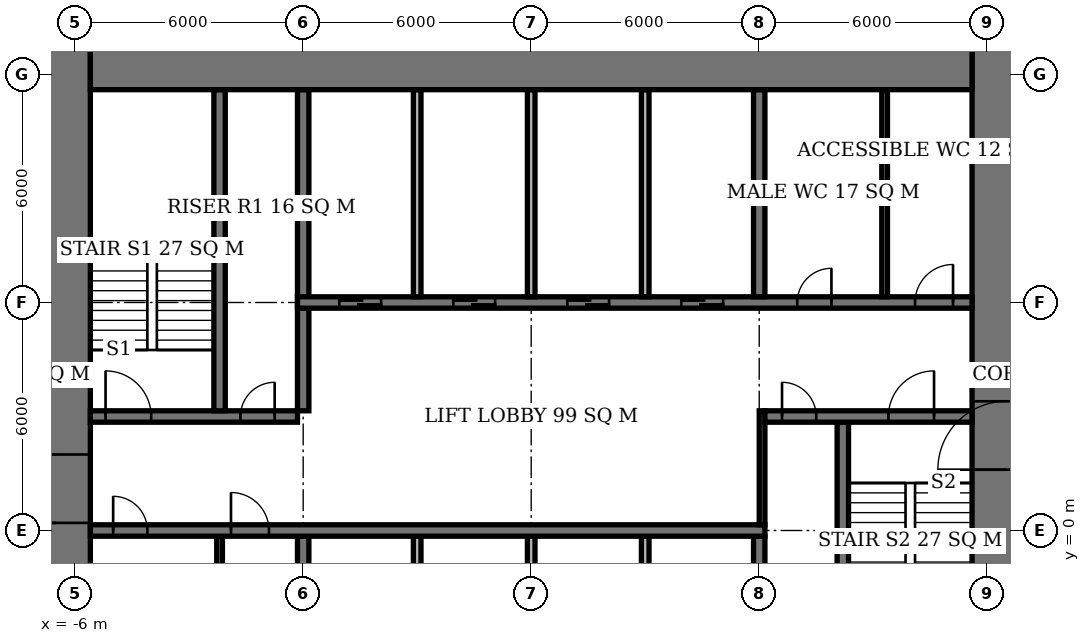
"""IFC4 building model, lengths in metres.
Left out: names, types, materials, properties, quantities, classifications, styles, units other than length and angle.
Written with IfcOpenShell. Run it as: python <this file> out.ifc"""

import sys

from ifc_helpers import new_model, si_unit, direction, frame, frame_2d, origin, place, context, subcontext, project, spatial, rectangle, extrude, element, fill, save


model = new_model("IFC4")
c1 = context("Model", 3, precision=1e-05, world=origin(), true_north=direction((0.0, 1.0)))
c2 = subcontext(c1, "Body", "Model", "MODEL_VIEW")
j1 = project(units=[si_unit("LENGTHUNIT", "METRE"), si_unit("PLANEANGLEUNIT", "RADIAN")], contexts=[c1])
p1 = place(None, origin())
s1 = spatial("IfcSite", under=j1, at=p1, CompositionType="ELEMENT")
p2 = place(p1, origin())
s2 = spatial("IfcBuilding", under=s1, at=p2, CompositionType="ELEMENT")
p3 = place(p2, frame((0.0, 0.0, 53.3)))
s3 = spatial("IfcBuildingStorey", under=s2, at=p3, CompositionType="ELEMENT", Elevation=53.3)
p4 = place(p3, frame((-5.6, 12.6, 0.0), z_axis=(0.0, 0.0, 1.0), x_axis=(1.0, 0.0, 0.0)))
e1 = element("IfcWall", 1, at=p4, inside=s3, PredefinedType="SHEAR", context=c2, shape_type="SweptSolid", body=[
    extrude(rectangle(XDim=23.2, YDim=2.0, at=frame_2d((11.6, 0.0))), origin(), (0.0, 0.0, 1.0), 3.9),
])
p5 = place(p3, frame((-6.5, -7.6, 0.0), z_axis=(0.0, 0.0, 1.0), x_axis=(0.0, 1.0, 0.0)))
e2 = element("IfcWall", 2, at=p5, inside=s3, PredefinedType="SHEAR", context=c2, shape_type="SweptSolid", body=[
    extrude(rectangle(XDim=21.2, YDim=1.8, at=frame_2d((10.6, 0.0))), origin(), (0.0, 0.0, 1.0), 3.9),
])
p6 = place(p5, frame((7.8, 0.0, 0.0)))
e3 = element("IfcOpeningElement", 3, at=p6, cuts=e2, PredefinedType="OPENING", context=c2, shape_type="SweptSolid", body=[
    extrude(rectangle(XDim=1.8, YDim=2.4, at=frame_2d((0.9, 1.2))), frame((0.0, 0.91, 0.0), z_axis=(0.0, -1.0, 0.0), x_axis=(1.0, 0.0, 0.0)), (0.0, 0.0, 1.0), 1.82),
])
p7 = place(p3, frame((18.5, -7.6, 0.0), z_axis=(0.0, 0.0, 1.0), x_axis=(0.0, 1.0, 0.0)))
e4 = element("IfcWall", 4, at=p7, inside=s3, PredefinedType="SHEAR", context=c2, shape_type="SweptSolid", body=[
    extrude(rectangle(XDim=21.2, YDim=1.8, at=frame_2d((10.6, 0.0))), origin(), (0.0, 0.0, 1.0), 3.9),
])
p8 = place(p7, frame((9.2, 0.0, 0.0)))
e5 = element("IfcOpeningElement", 5, at=p8, cuts=e4, PredefinedType="OPENING", context=c2, shape_type="SweptSolid", body=[
    extrude(rectangle(XDim=1.8, YDim=2.4, at=frame_2d((0.9, 1.2))), frame((0.0, 0.91, 0.0), z_axis=(0.0, -1.0, 0.0), x_axis=(1.0, 0.0, 0.0)), (0.0, 0.0, 1.0), 1.82),
])
p9 = place(p3, frame((-5.6, 0.0, 0.0), z_axis=(0.0, 0.0, 1.0), x_axis=(1.0, 0.0, 0.0)))
e6 = element("IfcWall", 6, at=p9, inside=s3, PredefinedType="SHEAR", context=c2, shape_type="SweptSolid", body=[
    extrude(rectangle(XDim=17.75, YDim=0.3, at=frame_2d((8.875, 0.0))), origin(), (0.0, 0.0, 1.0), 3.9),
])
p10 = place(p9, frame((0.6, 0.0, 0.0)))
e7 = element("IfcOpeningElement", 7, at=p10, cuts=e6, PredefinedType="OPENING", context=c2, shape_type="SweptSolid", body=[
    extrude(rectangle(XDim=0.9, YDim=2.1, at=frame_2d((0.45, 1.05))), frame((0.0, 0.16, 0.0), z_axis=(0.0, -1.0, 0.0), x_axis=(1.0, 0.0, 0.0)), (0.0, 0.0, 1.0), 0.32),
])
p11 = place(p9, frame((3.7, 0.0, 0.0)))
e8 = element("IfcOpeningElement", 8, at=p11, cuts=e6, PredefinedType="OPENING", context=c2, shape_type="SweptSolid", body=[
    extrude(rectangle(XDim=1.0, YDim=2.1, at=frame_2d((0.5, 1.05))), frame((0.0, 0.16, 0.0), z_axis=(0.0, -1.0, 0.0), x_axis=(1.0, 0.0, 0.0)), (0.0, 0.0, 1.0), 0.32),
])
p12 = place(p3, frame((-5.6, 3.0, 0.0), z_axis=(0.0, 0.0, 1.0), x_axis=(1.0, 0.0, 0.0)))
e9 = element("IfcWall", 9, at=p12, inside=s3, PredefinedType="SHEAR", context=c2, shape_type="SweptSolid", body=[
    extrude(rectangle(XDim=5.45, YDim=0.3, at=frame_2d((2.725, 0.0))), origin(), (0.0, 0.0, 1.0), 3.9),
])
p13 = place(p12, frame((0.4, 0.0, 0.0)))
e10 = element("IfcOpeningElement", 10, at=p13, cuts=e9, PredefinedType="OPENING", context=c2, shape_type="SweptSolid", body=[
    extrude(rectangle(XDim=1.2, YDim=2.1, at=frame_2d((0.6, 1.05))), frame((0.0, 0.16, 0.0), z_axis=(0.0, -1.0, 0.0), x_axis=(1.0, 0.0, 0.0)), (0.0, 0.0, 1.0), 0.32),
])
p14 = place(p12, frame((3.95, 0.0, 0.0)))
e11 = element("IfcOpeningElement", 11, at=p14, cuts=e9, PredefinedType="OPENING", context=c2, shape_type="SweptSolid", body=[
    extrude(rectangle(XDim=0.9, YDim=2.1, at=frame_2d((0.45, 1.05))), frame((0.0, 0.16, 0.0), z_axis=(0.0, -1.0, 0.0), x_axis=(1.0, 0.0, 0.0)), (0.0, 0.0, 1.0), 0.32),
])
p15 = place(p3, frame((12.15, 3.0, 0.0), z_axis=(0.0, 0.0, 1.0), x_axis=(1.0, 0.0, 0.0)))
e12 = element("IfcWall", 12, at=p15, inside=s3, PredefinedType="SHEAR", context=c2, shape_type="SweptSolid", body=[
    extrude(rectangle(XDim=5.45, YDim=0.3, at=frame_2d((2.725, 0.0))), origin(), (0.0, 0.0, 1.0), 3.9),
])
p16 = place(p15, frame((3.25, 0.0, 0.0)))
e13 = element("IfcOpeningElement", 13, at=p16, cuts=e12, PredefinedType="OPENING", context=c2, shape_type="SweptSolid", body=[
    extrude(rectangle(XDim=1.2, YDim=2.1, at=frame_2d((0.6, 1.05))), frame((0.0, 0.16, 0.0), z_axis=(0.0, -1.0, 0.0), x_axis=(1.0, 0.0, 0.0)), (0.0, 0.0, 1.0), 0.32),
])
p17 = place(p15, frame((0.45, 0.0, 0.0)))
e14 = element("IfcOpeningElement", 14, at=p17, cuts=e12, PredefinedType="OPENING", context=c2, shape_type="SweptSolid", body=[
    extrude(rectangle(XDim=0.9, YDim=2.1, at=frame_2d((0.45, 1.05))), frame((0.0, 0.16, 0.0), z_axis=(0.0, -1.0, 0.0), x_axis=(1.0, 0.0, 0.0)), (0.0, 0.0, 1.0), 0.32),
])
p18 = place(p3, frame((-0.15, 6.0, 0.0), z_axis=(0.0, 0.0, 1.0), x_axis=(1.0, 0.0, 0.0)))
e15 = element("IfcWall", 15, at=p18, inside=s3, PredefinedType="SHEAR", context=c2, shape_type="SweptSolid", body=[
    extrude(rectangle(XDim=17.75, YDim=0.3, at=frame_2d((8.875, 0.0))), origin(), (0.0, 0.0, 1.0), 3.9),
])
p19 = place(p18, frame((13.15, 0.0, 0.0)))
e16 = element("IfcOpeningElement", 16, at=p19, cuts=e15, PredefinedType="OPENING", context=c2, shape_type="SweptSolid", body=[
    extrude(rectangle(XDim=0.9, YDim=2.1, at=frame_2d((0.45, 1.05))), frame((0.0, 0.16, 0.0), z_axis=(0.0, -1.0, 0.0), x_axis=(1.0, 0.0, 0.0)), (0.0, 0.0, 1.0), 0.32),
])
p20 = place(p18, frame((16.25, 0.0, 0.0)))
e17 = element("IfcOpeningElement", 17, at=p20, cuts=e15, PredefinedType="OPENING", context=c2, shape_type="SweptSolid", body=[
    extrude(rectangle(XDim=1.0, YDim=2.1, at=frame_2d((0.5, 1.05))), frame((0.0, 0.16, 0.0), z_axis=(0.0, -1.0, 0.0), x_axis=(1.0, 0.0, 0.0)), (0.0, 0.0, 1.0), 0.32),
])
p21 = place(p18, frame((1.1, 0.0, 0.0)))
e18 = element("IfcOpeningElement", 18, at=p21, cuts=e15, PredefinedType="OPENING", context=c2, shape_type="SweptSolid", body=[
    extrude(rectangle(XDim=1.1, YDim=2.1, at=frame_2d((0.55, 1.05))), frame((0.0, 0.16, 0.0), z_axis=(0.0, -1.0, 0.0), x_axis=(1.0, 0.0, 0.0)), (0.0, 0.0, 1.0), 0.32),
])
p22 = place(p18, frame((4.1, 0.0, 0.0)))
e19 = element("IfcOpeningElement", 19, at=p22, cuts=e15, PredefinedType="OPENING", context=c2, shape_type="SweptSolid", body=[
    extrude(rectangle(XDim=1.1, YDim=2.1, at=frame_2d((0.55, 1.05))), frame((0.0, 0.16, 0.0), z_axis=(0.0, -1.0, 0.0), x_axis=(1.0, 0.0, 0.0)), (0.0, 0.0, 1.0), 0.32),
])
p23 = place(p18, frame((7.1, 0.0, 0.0)))
e20 = element("IfcOpeningElement", 20, at=p23, cuts=e15, PredefinedType="OPENING", context=c2, shape_type="SweptSolid", body=[
    extrude(rectangle(XDim=1.1, YDim=2.1, at=frame_2d((0.55, 1.05))), frame((0.0, 0.16, 0.0), z_axis=(0.0, -1.0, 0.0), x_axis=(1.0, 0.0, 0.0)), (0.0, 0.0, 1.0), 0.32),
])
p24 = place(p18, frame((10.1, 0.0, 0.0)))
e21 = element("IfcOpeningElement", 21, at=p24, cuts=e15, PredefinedType="OPENING", context=c2, shape_type="SweptSolid", body=[
    extrude(rectangle(XDim=1.1, YDim=2.1, at=frame_2d((0.55, 1.05))), frame((0.0, 0.16, 0.0), z_axis=(0.0, -1.0, 0.0), x_axis=(1.0, 0.0, 0.0)), (0.0, 0.0, 1.0), 0.32),
])
p25 = place(p3, frame((0.0, -5.6, 0.0), z_axis=(0.0, 0.0, 1.0), x_axis=(0.0, 1.0, 0.0)))
e22 = element("IfcWall", 22, at=p25, inside=s3, PredefinedType="SHEAR", context=c2, shape_type="SweptSolid", body=[
    extrude(rectangle(XDim=5.45, YDim=0.3, at=frame_2d((2.725, 0.0))), origin(), (0.0, 0.0, 1.0), 3.9),
])
p26 = place(p3, frame((0.0, 3.15, 0.0), z_axis=(0.0, 0.0, 1.0), x_axis=(0.0, 1.0, 0.0)))
e23 = element("IfcWall", 23, at=p26, inside=s3, PredefinedType="SHEAR", context=c2, shape_type="SweptSolid", body=[
    extrude(rectangle(XDim=8.45, YDim=0.3, at=frame_2d((4.225, 0.0))), origin(), (0.0, 0.0, 1.0), 3.9),
])
for number, where, z_axis, x_axis in (
    (24, (12.0, -5.6, 0.0), (0.0, 0.0, 1.0), (0.0, 1.0, 0.0)),
    (25, (12.0, 6.15, 0.0), (0.0, 0.0, 1.0), (0.0, 1.0, 0.0)),
):
    element("IfcWall", number, at=place(p3, frame(where, z_axis=z_axis, x_axis=x_axis)), inside=s3, PredefinedType="SHEAR", context=c2, shape_type="SweptSolid", body=[
        extrude(rectangle(XDim=5.45, YDim=0.3, at=frame_2d((2.725, 0.0))), origin(), (0.0, 0.0, 1.0), 3.9),
    ])
for number, where, z_axis, x_axis in (
    (26, (-2.2, 3.15, 0.0), (0.0, 0.0, 1.0), (0.0, 1.0, 0.0)),
    (27, (14.2, -5.6, 0.0), (0.0, 0.0, 1.0), (0.0, 1.0, 0.0)),
):
    element("IfcWall", number, at=place(p3, frame(where, z_axis=z_axis, x_axis=x_axis)), inside=s3, PredefinedType="SHEAR", context=c2, shape_type="SweptSolid", body=[
        extrude(rectangle(XDim=8.45, YDim=0.3, at=frame_2d((4.225, 0.0))), origin(), (0.0, 0.0, 1.0), 3.9),
    ])
for number, where, z_axis, x_axis in (
    (28, (3.0, 6.15, 0.0), (0.0, 0.0, 1.0), (0.0, 1.0, 0.0)),
    (29, (6.0, 6.15, 0.0), (0.0, 0.0, 1.0), (0.0, 1.0, 0.0)),
    (30, (9.0, 6.15, 0.0), (0.0, 0.0, 1.0), (0.0, 1.0, 0.0)),
    (31, (3.0, -5.6, 0.0), (0.0, 0.0, 1.0), (0.0, 1.0, 0.0)),
    (32, (6.0, -5.6, 0.0), (0.0, 0.0, 1.0), (0.0, 1.0, 0.0)),
    (33, (9.0, -5.6, 0.0), (0.0, 0.0, 1.0), (0.0, 1.0, 0.0)),
):
    element("IfcWall", number, at=place(p3, frame(where, z_axis=z_axis, x_axis=x_axis)), inside=s3, PredefinedType="SOLIDWALL", context=c2, shape_type="SweptSolid", body=[
        extrude(rectangle(XDim=5.45, YDim=0.2, at=frame_2d((2.725, 0.0))), origin(), (0.0, 0.0, 1.0), 3.9),
    ])
for number, where, z_axis, x_axis in (
    (34, (-2.2, -5.6, 0.0), (0.0, 0.0, 1.0), (0.0, 1.0, 0.0)),
    (35, (15.3, 6.15, 0.0), (0.0, 0.0, 1.0), (0.0, 1.0, 0.0)),
):
    element("IfcWall", number, at=place(p3, frame(where, z_axis=z_axis, x_axis=x_axis)), inside=s3, PredefinedType="PLUMBINGWALL", context=c2, shape_type="SweptSolid", body=[
        extrude(rectangle(XDim=5.45, YDim=0.15, at=frame_2d((2.725, 0.0))), origin(), (0.0, 0.0, 1.0), 3.65),
    ])
p27 = place(p3, frame((12.075, 0.15, 0.0), z_axis=(0.0, 0.0, 1.0), x_axis=(0.0, 1.0, 0.0)))
e36 = element("IfcWall", 36, at=p27, inside=s3, PredefinedType="PARTITIONING", context=c2, shape_type="SweptSolid", body=[
    extrude(rectangle(XDim=3.0, YDim=0.15, at=frame_2d((1.5, 0.0))), origin(), (0.0, 0.0, 1.0), 3.65),
])
p28 = place(p6, origin())
e37 = element("IfcDoor", 37, at=p28, inside=s3, OperationType="DOUBLE_DOOR_SINGLE_SWING", PredefinedType="DOOR", context=c2, shape_type="SweptSolid", body=[
    extrude(rectangle(XDim=1.8, YDim=2.4, at=frame_2d((0.9, 1.2))), frame((0.0, 0.025, 0.0), z_axis=(0.0, -1.0, 0.0), x_axis=(1.0, 0.0, 0.0)), (0.0, 0.0, 1.0), 0.05),
])
fill(e3, e37)
p29 = place(p8, origin())
e38 = element("IfcDoor", 38, at=p29, inside=s3, OperationType="DOUBLE_DOOR_SINGLE_SWING", PredefinedType="DOOR", context=c2, shape_type="SweptSolid", body=[
    extrude(rectangle(XDim=1.8, YDim=2.4, at=frame_2d((0.9, 1.2))), frame((0.0, 0.025, 0.0), z_axis=(0.0, -1.0, 0.0), x_axis=(1.0, 0.0, 0.0)), (0.0, 0.0, 1.0), 0.05),
])
fill(e5, e38)
p30 = place(p13, origin())
e39 = element("IfcDoor", 39, at=p30, inside=s3, OperationType="SINGLE_SWING_LEFT", PredefinedType="DOOR", context=c2, shape_type="SweptSolid", body=[
    extrude(rectangle(XDim=1.2, YDim=2.1, at=frame_2d((0.6, 1.05))), frame((0.0, 0.025, 0.0), z_axis=(0.0, -1.0, 0.0), x_axis=(1.0, 0.0, 0.0)), (0.0, 0.0, 1.0), 0.05),
])
fill(e10, e39)
p31 = place(p14, origin())
e40 = element("IfcDoor", 40, at=p31, inside=s3, OperationType="SINGLE_SWING_RIGHT", PredefinedType="DOOR", context=c2, shape_type="SweptSolid", body=[
    extrude(rectangle(XDim=0.9, YDim=2.1, at=frame_2d((0.45, 1.05))), frame((0.0, 0.025, 0.0), z_axis=(0.0, -1.0, 0.0), x_axis=(1.0, 0.0, 0.0)), (0.0, 0.0, 1.0), 0.05),
])
fill(e11, e40)
p32 = place(p16, origin())
e41 = element("IfcDoor", 41, at=p32, inside=s3, OperationType="SINGLE_SWING_RIGHT", PredefinedType="DOOR", context=c2, shape_type="SweptSolid", body=[
    extrude(rectangle(XDim=1.2, YDim=2.1, at=frame_2d((0.6, 1.05))), frame((0.0, 0.025, 0.0), z_axis=(0.0, -1.0, 0.0), x_axis=(1.0, 0.0, 0.0)), (0.0, 0.0, 1.0), 0.05),
])
fill(e13, e41)
p33 = place(p17, origin())
e42 = element("IfcDoor", 42, at=p33, inside=s3, OperationType="SINGLE_SWING_LEFT", PredefinedType="DOOR", context=c2, shape_type="SweptSolid", body=[
    extrude(rectangle(XDim=0.9, YDim=2.1, at=frame_2d((0.45, 1.05))), frame((0.0, 0.025, 0.0), z_axis=(0.0, -1.0, 0.0), x_axis=(1.0, 0.0, 0.0)), (0.0, 0.0, 1.0), 0.05),
])
fill(e14, e42)
p34 = place(p10, origin())
e43 = element("IfcDoor", 43, at=p34, inside=s3, OperationType="SINGLE_SWING_LEFT", PredefinedType="DOOR", context=c2, shape_type="SweptSolid", body=[
    extrude(rectangle(XDim=0.9, YDim=2.1, at=frame_2d((0.45, 1.05))), frame((0.0, 0.025, 0.0), z_axis=(0.0, -1.0, 0.0), x_axis=(1.0, 0.0, 0.0)), (0.0, 0.0, 1.0), 0.05),
])
fill(e7, e43)
p35 = place(p11, origin())
e44 = element("IfcDoor", 44, at=p35, inside=s3, OperationType="SINGLE_SWING_LEFT", PredefinedType="DOOR", context=c2, shape_type="SweptSolid", body=[
    extrude(rectangle(XDim=1.0, YDim=2.1, at=frame_2d((0.5, 1.05))), frame((0.0, 0.025, 0.0), z_axis=(0.0, -1.0, 0.0), x_axis=(1.0, 0.0, 0.0)), (0.0, 0.0, 1.0), 0.05),
])
fill(e8, e44)
p36 = place(p19, origin())
e45 = element("IfcDoor", 45, at=p36, inside=s3, OperationType="SINGLE_SWING_RIGHT", PredefinedType="DOOR", context=c2, shape_type="SweptSolid", body=[
    extrude(rectangle(XDim=0.9, YDim=2.1, at=frame_2d((0.45, 1.05))), frame((0.0, 0.025, 0.0), z_axis=(0.0, -1.0, 0.0), x_axis=(1.0, 0.0, 0.0)), (0.0, 0.0, 1.0), 0.05),
])
fill(e16, e45)
p37 = place(p20, origin())
e46 = element("IfcDoor", 46, at=p37, inside=s3, OperationType="SINGLE_SWING_RIGHT", PredefinedType="DOOR", context=c2, shape_type="SweptSolid", body=[
    extrude(rectangle(XDim=1.0, YDim=2.1, at=frame_2d((0.5, 1.05))), frame((0.0, 0.025, 0.0), z_axis=(0.0, -1.0, 0.0), x_axis=(1.0, 0.0, 0.0)), (0.0, 0.0, 1.0), 0.05),
])
fill(e17, e46)
p38 = place(p21, origin())
e47 = element("IfcDoor", 47, at=p38, inside=s3, OperationType="DOUBLE_DOOR_SLIDING", PredefinedType="USERDEFINED", context=c2, shape_type="SweptSolid", body=[
    extrude(rectangle(XDim=1.1, YDim=2.1, at=frame_2d((0.55, 1.05))), frame((0.0, 0.025, 0.0), z_axis=(0.0, -1.0, 0.0), x_axis=(1.0, 0.0, 0.0)), (0.0, 0.0, 1.0), 0.05),
])
fill(e18, e47)
p39 = place(p22, origin())
e48 = element("IfcDoor", 48, at=p39, inside=s3, OperationType="DOUBLE_DOOR_SLIDING", PredefinedType="USERDEFINED", context=c2, shape_type="SweptSolid", body=[
    extrude(rectangle(XDim=1.1, YDim=2.1, at=frame_2d((0.55, 1.05))), frame((0.0, 0.025, 0.0), z_axis=(0.0, -1.0, 0.0), x_axis=(1.0, 0.0, 0.0)), (0.0, 0.0, 1.0), 0.05),
])
fill(e19, e48)
p40 = place(p23, origin())
e49 = element("IfcDoor", 49, at=p40, inside=s3, OperationType="DOUBLE_DOOR_SLIDING", PredefinedType="USERDEFINED", context=c2, shape_type="SweptSolid", body=[
    extrude(rectangle(XDim=1.1, YDim=2.1, at=frame_2d((0.55, 1.05))), frame((0.0, 0.025, 0.0), z_axis=(0.0, -1.0, 0.0), x_axis=(1.0, 0.0, 0.0)), (0.0, 0.0, 1.0), 0.05),
])
fill(e20, e49)
p41 = place(p24, origin())
e50 = element("IfcDoor", 50, at=p41, inside=s3, OperationType="DOUBLE_DOOR_SLIDING", PredefinedType="USERDEFINED", context=c2, shape_type="SweptSolid", body=[
    extrude(rectangle(XDim=1.1, YDim=2.1, at=frame_2d((0.55, 1.05))), frame((0.0, 0.025, 0.0), z_axis=(0.0, -1.0, 0.0), x_axis=(1.0, 0.0, 0.0)), (0.0, 0.0, 1.0), 0.05),
])
fill(e21, e50)
save(model, sys.argv[1])
